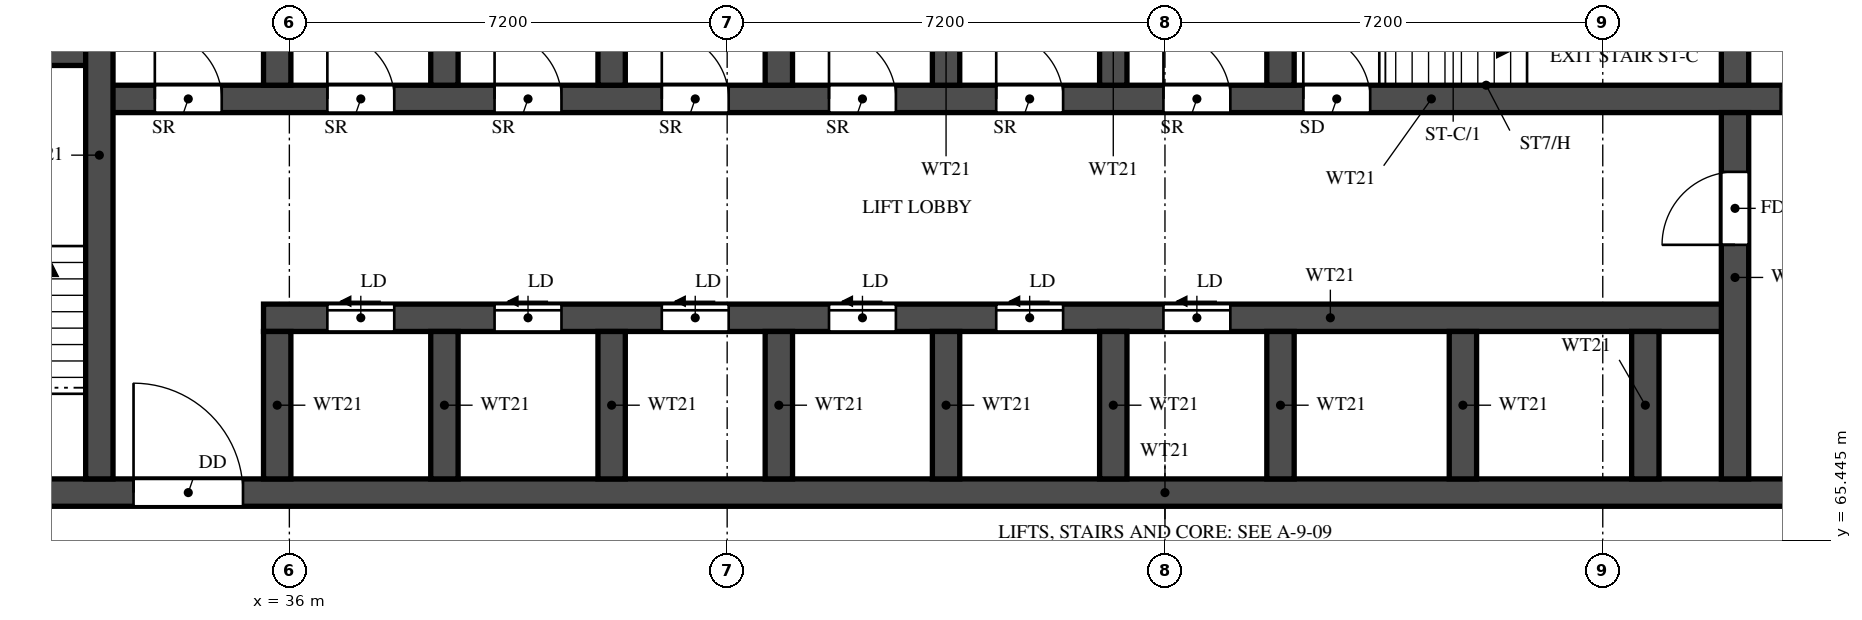
"""IFC4 building model, lengths in metres.
Left out: names, types, materials, properties, quantities, classifications, styles, units other than length and angle.
Written with IfcOpenShell. Run it as: python <this file> out.ifc"""

import sys

from ifc_helpers import new_model, si_unit, direction, frame, frame_2d, origin, place, context, subcontext, project, spatial, rectangle, extrude, element, fill, save


model = new_model("IFC4")
c1 = context("Model", 3, precision=1e-05, world=origin(), true_north=direction((0.0, 1.0)))
c2 = subcontext(c1, "Body", "Model", "MODEL_VIEW")
j1 = project(units=[si_unit("LENGTHUNIT", "METRE"), si_unit("PLANEANGLEUNIT", "RADIAN")], contexts=[c1])
p1 = place(None, origin())
s1 = spatial("IfcSite", under=j1, at=p1, CompositionType="ELEMENT")
p2 = place(p1, origin())
s2 = spatial("IfcBuilding", under=s1, at=p2, CompositionType="ELEMENT")
p3 = place(p2, frame((0.0, 0.0, 41.0)))
s3 = spatial("IfcBuildingStorey", under=s2, at=p3, CompositionType="ELEMENT", Elevation=41.0)
p4 = place(p3, frame((29.7, 66.225, 0.0), z_axis=(0.0, 0.0, 1.0), x_axis=(1.0, 0.0, 0.0)))
e1 = element("IfcWall", 1, at=p4, inside=s3, PredefinedType="SHEAR", context=c2, shape_type="SweptSolid", body=[
    extrude(rectangle(XDim=41.4, YDim=0.45, at=frame_2d((20.7, 0.0))), origin(), (0.0, 0.0, 1.0), 3.18),
])
p5 = place(p4, frame((0.925, 0.0, 0.0)))
e2 = element("IfcOpeningElement", 2, at=p5, cuts=e1, PredefinedType="OPENING", context=c2, shape_type="SweptSolid", body=[
    extrude(rectangle(XDim=1.1, YDim=2.1, at=frame_2d((0.55, 1.05))), frame((0.0, 0.235, 0.0), z_axis=(0.0, -1.0, 0.0), x_axis=(1.0, 0.0, 0.0)), (0.0, 0.0, 1.0), 0.47),
])
p6 = place(p4, frame((3.738, 0.0, 0.0)))
e3 = element("IfcOpeningElement", 3, at=p6, cuts=e1, PredefinedType="OPENING", context=c2, shape_type="SweptSolid", body=[
    extrude(rectangle(XDim=1.8, YDim=2.1, at=frame_2d((0.9, 1.05))), frame((0.0, 0.235, 0.0), z_axis=(0.0, -1.0, 0.0), x_axis=(1.0, 0.0, 0.0)), (0.0, 0.0, 1.0), 0.47),
])
p7 = place(p3, frame((35.575, 69.1, 0.0), z_axis=(0.0, 0.0, 1.0), x_axis=(1.0, 0.0, 0.0)))
e4 = element("IfcWall", 4, at=p7, inside=s3, PredefinedType="SHEAR", context=c2, shape_type="SweptSolid", body=[
    extrude(rectangle(XDim=24.2, YDim=0.45, at=frame_2d((12.1, 0.0))), origin(), (0.0, 0.0, 1.0), 3.18),
])
p8 = place(p7, frame((1.05, 0.0, 0.0)))
e5 = element("IfcOpeningElement", 5, at=p8, cuts=e4, PredefinedType="OPENING", context=c2, shape_type="SweptSolid", body=[
    extrude(rectangle(XDim=1.1, YDim=2.1, at=frame_2d((0.55, 1.05))), frame((0.0, 0.235, 0.0), z_axis=(0.0, -1.0, 0.0), x_axis=(1.0, 0.0, 0.0)), (0.0, 0.0, 1.0), 0.47),
])
p9 = place(p7, frame((3.8, 0.0, 0.0)))
e6 = element("IfcOpeningElement", 6, at=p9, cuts=e4, PredefinedType="OPENING", context=c2, shape_type="SweptSolid", body=[
    extrude(rectangle(XDim=1.1, YDim=2.1, at=frame_2d((0.55, 1.05))), frame((0.0, 0.235, 0.0), z_axis=(0.0, -1.0, 0.0), x_axis=(1.0, 0.0, 0.0)), (0.0, 0.0, 1.0), 0.47),
])
p10 = place(p7, frame((6.55, 0.0, 0.0)))
e7 = element("IfcOpeningElement", 7, at=p10, cuts=e4, PredefinedType="OPENING", context=c2, shape_type="SweptSolid", body=[
    extrude(rectangle(XDim=1.1, YDim=2.1, at=frame_2d((0.55, 1.05))), frame((0.0, 0.235, 0.0), z_axis=(0.0, -1.0, 0.0), x_axis=(1.0, 0.0, 0.0)), (0.0, 0.0, 1.0), 0.47),
])
p11 = place(p7, frame((9.3, 0.0, 0.0)))
e8 = element("IfcOpeningElement", 8, at=p11, cuts=e4, PredefinedType="OPENING", context=c2, shape_type="SweptSolid", body=[
    extrude(rectangle(XDim=1.1, YDim=2.1, at=frame_2d((0.55, 1.05))), frame((0.0, 0.235, 0.0), z_axis=(0.0, -1.0, 0.0), x_axis=(1.0, 0.0, 0.0)), (0.0, 0.0, 1.0), 0.47),
])
p12 = place(p7, frame((12.05, 0.0, 0.0)))
e9 = element("IfcOpeningElement", 9, at=p12, cuts=e4, PredefinedType="OPENING", context=c2, shape_type="SweptSolid", body=[
    extrude(rectangle(XDim=1.1, YDim=2.1, at=frame_2d((0.55, 1.05))), frame((0.0, 0.235, 0.0), z_axis=(0.0, -1.0, 0.0), x_axis=(1.0, 0.0, 0.0)), (0.0, 0.0, 1.0), 0.47),
])
p13 = place(p7, frame((14.8, 0.0, 0.0)))
e10 = element("IfcOpeningElement", 10, at=p13, cuts=e4, PredefinedType="OPENING", context=c2, shape_type="SweptSolid", body=[
    extrude(rectangle(XDim=1.1, YDim=2.1, at=frame_2d((0.55, 1.05))), frame((0.0, 0.235, 0.0), z_axis=(0.0, -1.0, 0.0), x_axis=(1.0, 0.0, 0.0)), (0.0, 0.0, 1.0), 0.47),
])
p14 = place(p3, frame((32.875, 72.7, 0.0), z_axis=(0.0, 0.0, 1.0), x_axis=(1.0, 0.0, 0.0)))
e11 = element("IfcWall", 11, at=p14, inside=s3, PredefinedType="SHEAR", context=c2, shape_type="SweptSolid", body=[
    extrude(rectangle(XDim=35.05, YDim=0.45, at=frame_2d((17.525, 0.0))), origin(), (0.0, 0.0, 1.0), 3.18),
])
p15 = place(p14, frame((19.8, 0.0, 0.0)))
e12 = element("IfcOpeningElement", 12, at=p15, cuts=e11, PredefinedType="OPENING", context=c2, shape_type="SweptSolid", body=[
    extrude(rectangle(XDim=1.1, YDim=2.1, at=frame_2d((0.55, 1.05))), frame((0.0, 0.235, 0.0), z_axis=(0.0, -1.0, 0.0), x_axis=(1.0, 0.0, 0.0)), (0.0, 0.0, 1.0), 0.47),
])
p16 = place(p14, frame((27.65, 0.0, 0.0)))
e13 = element("IfcOpeningElement", 13, at=p16, cuts=e11, PredefinedType="OPENING", context=c2, shape_type="SweptSolid", body=[
    extrude(rectangle(XDim=1.1, YDim=2.1, at=frame_2d((0.55, 1.05))), frame((0.0, 0.235, 0.0), z_axis=(0.0, -1.0, 0.0), x_axis=(1.0, 0.0, 0.0)), (0.0, 0.0, 1.0), 0.47),
])
p17 = place(p14, frame((30.25, 0.0, 0.0)))
e14 = element("IfcOpeningElement", 14, at=p17, cuts=e11, PredefinedType="OPENING", context=c2, shape_type="SweptSolid", body=[
    extrude(rectangle(XDim=1.1, YDim=2.1, at=frame_2d((0.55, 1.05))), frame((0.0, 0.235, 0.0), z_axis=(0.0, -1.0, 0.0), x_axis=(1.0, 0.0, 0.0)), (0.0, 0.0, 1.0), 0.47),
])
p18 = place(p14, frame((3.75, 0.0, 0.0)))
e15 = element("IfcOpeningElement", 15, at=p18, cuts=e11, PredefinedType="OPENING", context=c2, shape_type="SweptSolid", body=[
    extrude(rectangle(XDim=1.1, YDim=2.1, at=frame_2d((0.55, 1.05))), frame((0.0, 0.235, 0.0), z_axis=(0.0, -1.0, 0.0), x_axis=(1.0, 0.0, 0.0)), (0.0, 0.0, 1.0), 0.47),
])
p19 = place(p14, frame((6.5, 0.0, 0.0)))
e16 = element("IfcOpeningElement", 16, at=p19, cuts=e11, PredefinedType="OPENING", context=c2, shape_type="SweptSolid", body=[
    extrude(rectangle(XDim=1.1, YDim=2.1, at=frame_2d((0.55, 1.05))), frame((0.0, 0.235, 0.0), z_axis=(0.0, -1.0, 0.0), x_axis=(1.0, 0.0, 0.0)), (0.0, 0.0, 1.0), 0.47),
])
p20 = place(p14, frame((9.25, 0.0, 0.0)))
e17 = element("IfcOpeningElement", 17, at=p20, cuts=e11, PredefinedType="OPENING", context=c2, shape_type="SweptSolid", body=[
    extrude(rectangle(XDim=1.1, YDim=2.1, at=frame_2d((0.55, 1.05))), frame((0.0, 0.235, 0.0), z_axis=(0.0, -1.0, 0.0), x_axis=(1.0, 0.0, 0.0)), (0.0, 0.0, 1.0), 0.47),
])
p21 = place(p14, frame((12.0, 0.0, 0.0)))
e18 = element("IfcOpeningElement", 18, at=p21, cuts=e11, PredefinedType="OPENING", context=c2, shape_type="SweptSolid", body=[
    extrude(rectangle(XDim=1.1, YDim=2.1, at=frame_2d((0.55, 1.05))), frame((0.0, 0.235, 0.0), z_axis=(0.0, -1.0, 0.0), x_axis=(1.0, 0.0, 0.0)), (0.0, 0.0, 1.0), 0.47),
])
p22 = place(p14, frame((14.75, 0.0, 0.0)))
e19 = element("IfcOpeningElement", 19, at=p22, cuts=e11, PredefinedType="OPENING", context=c2, shape_type="SweptSolid", body=[
    extrude(rectangle(XDim=1.1, YDim=2.1, at=frame_2d((0.55, 1.05))), frame((0.0, 0.235, 0.0), z_axis=(0.0, -1.0, 0.0), x_axis=(1.0, 0.0, 0.0)), (0.0, 0.0, 1.0), 0.47),
])
p23 = place(p14, frame((17.5, 0.0, 0.0)))
e20 = element("IfcOpeningElement", 20, at=p23, cuts=e11, PredefinedType="OPENING", context=c2, shape_type="SweptSolid", body=[
    extrude(rectangle(XDim=1.1, YDim=2.1, at=frame_2d((0.55, 1.05))), frame((0.0, 0.235, 0.0), z_axis=(0.0, -1.0, 0.0), x_axis=(1.0, 0.0, 0.0)), (0.0, 0.0, 1.0), 0.47),
])
p24 = place(p14, frame((0.913, 0.0, 0.0)))
e21 = element("IfcOpeningElement", 21, at=p24, cuts=e11, PredefinedType="OPENING", context=c2, shape_type="SweptSolid", body=[
    extrude(rectangle(XDim=1.1, YDim=2.1, at=frame_2d((0.55, 1.05))), frame((0.0, 0.235, 0.0), z_axis=(0.0, -1.0, 0.0), x_axis=(1.0, 0.0, 0.0)), (0.0, 0.0, 1.0), 0.47),
])
p25 = place(p3, frame((29.7, 73.475, 0.0), z_axis=(0.0, 0.0, 1.0), x_axis=(1.0, 0.0, 0.0)))
e22 = element("IfcWall", 22, at=p25, inside=s3, PredefinedType="SHEAR", context=c2, shape_type="SweptSolid", body=[
    extrude(rectangle(XDim=3.175, YDim=0.45, at=frame_2d((1.587, 0.0))), origin(), (0.0, 0.0, 1.0), 3.18),
])
p26 = place(p3, frame((32.875, 66.45, 0.0), z_axis=(0.0, 0.0, 1.0), x_axis=(0.0, 1.0, 0.0)))
e23 = element("IfcWall", 23, at=p26, inside=s3, PredefinedType="SHEAR", context=c2, shape_type="SweptSolid", body=[
    extrude(rectangle(XDim=10.65, YDim=0.45, at=frame_2d((5.325, 0.0))), origin(), (0.0, 0.0, 1.0), 3.18),
])
p27 = place(p3, frame((59.775, 66.45, 0.0), z_axis=(0.0, 0.0, 1.0), x_axis=(0.0, 1.0, 0.0)))
e24 = element("IfcWall", 24, at=p27, inside=s3, PredefinedType="SHEAR", context=c2, shape_type="SweptSolid", body=[
    extrude(rectangle(XDim=6.025, YDim=0.45, at=frame_2d((3.013, 0.0))), origin(), (0.0, 0.0, 1.0), 3.18),
])
p28 = place(p27, frame((3.85, 0.0, 0.0)))
e25 = element("IfcOpeningElement", 25, at=p28, cuts=e24, PredefinedType="OPENING", context=c2, shape_type="SweptSolid", body=[
    extrude(rectangle(XDim=1.2, YDim=2.1, at=frame_2d((0.6, 1.05))), frame((0.0, 0.235, 0.0), z_axis=(0.0, -1.0, 0.0), x_axis=(1.0, 0.0, 0.0)), (0.0, 0.0, 1.0), 0.47),
])
p29 = place(p3, frame((59.775, 72.925, 0.0), z_axis=(0.0, 0.0, 1.0), x_axis=(0.0, 1.0, 0.0)))
e26 = element("IfcWall", 26, at=p29, inside=s3, PredefinedType="SHEAR", context=c2, shape_type="SweptSolid", body=[
    extrude(rectangle(XDim=2.95, YDim=0.45, at=frame_2d((1.475, 0.0))), origin(), (0.0, 0.0, 1.0), 3.18),
])
for number, where, z_axis, x_axis in (
    (27, (35.8, 66.45, 0.0), (0.0, 0.0, 1.0), (0.0, 1.0, 0.0)),
    (28, (38.55, 66.45, 0.0), (0.0, 0.0, 1.0), (0.0, 1.0, 0.0)),
    (29, (41.3, 66.45, 0.0), (0.0, 0.0, 1.0), (0.0, 1.0, 0.0)),
    (30, (44.05, 66.45, 0.0), (0.0, 0.0, 1.0), (0.0, 1.0, 0.0)),
    (31, (46.8, 66.45, 0.0), (0.0, 0.0, 1.0), (0.0, 1.0, 0.0)),
    (32, (49.55, 66.45, 0.0), (0.0, 0.0, 1.0), (0.0, 1.0, 0.0)),
    (33, (52.3, 66.45, 0.0), (0.0, 0.0, 1.0), (0.0, 1.0, 0.0)),
    (34, (55.3, 66.45, 0.0), (0.0, 0.0, 1.0), (0.0, 1.0, 0.0)),
    (35, (58.3, 66.45, 0.0), (0.0, 0.0, 1.0), (0.0, 1.0, 0.0)),
):
    element("IfcWall", number, at=place(p3, frame(where, z_axis=z_axis, x_axis=x_axis)), inside=s3, PredefinedType="SHEAR", context=c2, shape_type="SweptSolid", body=[
        extrude(rectangle(XDim=2.425, YDim=0.45, at=frame_2d((1.212, 0.0))), origin(), (0.0, 0.0, 1.0), 3.18),
    ])
for number, where, z_axis, x_axis in (
    (36, (35.8, 72.925, 0.0), (0.0, 0.0, 1.0), (0.0, 1.0, 0.0)),
    (37, (38.55, 72.925, 0.0), (0.0, 0.0, 1.0), (0.0, 1.0, 0.0)),
    (38, (41.3, 72.925, 0.0), (0.0, 0.0, 1.0), (0.0, 1.0, 0.0)),
    (39, (44.05, 72.925, 0.0), (0.0, 0.0, 1.0), (0.0, 1.0, 0.0)),
    (40, (46.8, 72.925, 0.0), (0.0, 0.0, 1.0), (0.0, 1.0, 0.0)),
    (41, (49.55, 72.925, 0.0), (0.0, 0.0, 1.0), (0.0, 1.0, 0.0)),
    (42, (52.3, 72.925, 0.0), (0.0, 0.0, 1.0), (0.0, 1.0, 0.0)),
):
    element("IfcWall", number, at=place(p3, frame(where, z_axis=z_axis, x_axis=x_axis)), inside=s3, PredefinedType="SHEAR", context=c2, shape_type="SweptSolid", body=[
        extrude(rectangle(XDim=2.95, YDim=0.45, at=frame_2d((1.475, 0.0))), origin(), (0.0, 0.0, 1.0), 3.18),
    ])
p30 = place(p15, origin())
e43 = element("IfcDoor", 43, at=p30, inside=s3, OperationType="SINGLE_SWING_LEFT", PredefinedType="DOOR", context=c2, shape_type="SweptSolid", body=[
    extrude(rectangle(XDim=1.1, YDim=2.1, at=frame_2d((0.55, 1.05))), frame((0.0, 0.025, 0.0), z_axis=(0.0, -1.0, 0.0), x_axis=(1.0, 0.0, 0.0)), (0.0, 0.0, 1.0), 0.05),
])
fill(e12, e43)
p31 = place(p6, origin())
e44 = element("IfcDoor", 44, at=p31, inside=s3, OperationType="DOUBLE_DOOR_SINGLE_SWING", PredefinedType="DOOR", context=c2, shape_type="SweptSolid", body=[
    extrude(rectangle(XDim=1.8, YDim=2.1, at=frame_2d((0.9, 1.05))), frame((0.0, 0.025, 0.0), z_axis=(0.0, -1.0, 0.0), x_axis=(1.0, 0.0, 0.0)), (0.0, 0.0, 1.0), 0.05),
])
fill(e3, e44)
p32 = place(p28, origin())
e45 = element("IfcDoor", 45, at=p32, inside=s3, OperationType="SINGLE_SWING_RIGHT", PredefinedType="DOOR", context=c2, shape_type="SweptSolid", body=[
    extrude(rectangle(XDim=1.2, YDim=2.1, at=frame_2d((0.6, 1.05))), frame((0.0, 0.025, 0.0), z_axis=(0.0, -1.0, 0.0), x_axis=(1.0, 0.0, 0.0)), (0.0, 0.0, 1.0), 0.05),
])
fill(e25, e45)
p33 = place(p16, origin())
e46 = element("IfcDoor", 46, at=p33, inside=s3, OperationType="SLIDING_TO_LEFT", PredefinedType="DOOR", context=c2, shape_type="SweptSolid", body=[
    extrude(rectangle(XDim=1.1, YDim=2.1, at=frame_2d((0.55, 1.05))), frame((0.0, 0.025, 0.0), z_axis=(0.0, -1.0, 0.0), x_axis=(1.0, 0.0, 0.0)), (0.0, 0.0, 1.0), 0.05),
])
fill(e13, e46)
p34 = place(p8, origin())
e47 = element("IfcDoor", 47, at=p34, inside=s3, OperationType="SLIDING_TO_LEFT", PredefinedType="DOOR", context=c2, shape_type="SweptSolid", body=[
    extrude(rectangle(XDim=1.1, YDim=2.1, at=frame_2d((0.55, 1.05))), frame((0.0, 0.025, 0.0), z_axis=(0.0, -1.0, 0.0), x_axis=(1.0, 0.0, 0.0)), (0.0, 0.0, 1.0), 0.05),
])
fill(e5, e47)
p35 = place(p9, origin())
e48 = element("IfcDoor", 48, at=p35, inside=s3, OperationType="SLIDING_TO_LEFT", PredefinedType="DOOR", context=c2, shape_type="SweptSolid", body=[
    extrude(rectangle(XDim=1.1, YDim=2.1, at=frame_2d((0.55, 1.05))), frame((0.0, 0.025, 0.0), z_axis=(0.0, -1.0, 0.0), x_axis=(1.0, 0.0, 0.0)), (0.0, 0.0, 1.0), 0.05),
])
fill(e6, e48)
p36 = place(p10, origin())
e49 = element("IfcDoor", 49, at=p36, inside=s3, OperationType="SLIDING_TO_LEFT", PredefinedType="DOOR", context=c2, shape_type="SweptSolid", body=[
    extrude(rectangle(XDim=1.1, YDim=2.1, at=frame_2d((0.55, 1.05))), frame((0.0, 0.025, 0.0), z_axis=(0.0, -1.0, 0.0), x_axis=(1.0, 0.0, 0.0)), (0.0, 0.0, 1.0), 0.05),
])
fill(e7, e49)
p37 = place(p11, origin())
e50 = element("IfcDoor", 50, at=p37, inside=s3, OperationType="SLIDING_TO_LEFT", PredefinedType="DOOR", context=c2, shape_type="SweptSolid", body=[
    extrude(rectangle(XDim=1.1, YDim=2.1, at=frame_2d((0.55, 1.05))), frame((0.0, 0.025, 0.0), z_axis=(0.0, -1.0, 0.0), x_axis=(1.0, 0.0, 0.0)), (0.0, 0.0, 1.0), 0.05),
])
fill(e8, e50)
p38 = place(p12, origin())
e51 = element("IfcDoor", 51, at=p38, inside=s3, OperationType="SLIDING_TO_LEFT", PredefinedType="DOOR", context=c2, shape_type="SweptSolid", body=[
    extrude(rectangle(XDim=1.1, YDim=2.1, at=frame_2d((0.55, 1.05))), frame((0.0, 0.025, 0.0), z_axis=(0.0, -1.0, 0.0), x_axis=(1.0, 0.0, 0.0)), (0.0, 0.0, 1.0), 0.05),
])
fill(e9, e51)
p39 = place(p13, origin())
e52 = element("IfcDoor", 52, at=p39, inside=s3, OperationType="SLIDING_TO_LEFT", PredefinedType="DOOR", context=c2, shape_type="SweptSolid", body=[
    extrude(rectangle(XDim=1.1, YDim=2.1, at=frame_2d((0.55, 1.05))), frame((0.0, 0.025, 0.0), z_axis=(0.0, -1.0, 0.0), x_axis=(1.0, 0.0, 0.0)), (0.0, 0.0, 1.0), 0.05),
])
fill(e10, e52)
p40 = place(p18, origin())
e53 = element("IfcDoor", 53, at=p40, inside=s3, OperationType="SINGLE_SWING_LEFT", PredefinedType="DOOR", context=c2, shape_type="SweptSolid", body=[
    extrude(rectangle(XDim=1.1, YDim=2.1, at=frame_2d((0.55, 1.05))), frame((0.0, 0.025, 0.0), z_axis=(0.0, -1.0, 0.0), x_axis=(1.0, 0.0, 0.0)), (0.0, 0.0, 1.0), 0.05),
])
fill(e15, e53)
p41 = place(p19, origin())
e54 = element("IfcDoor", 54, at=p41, inside=s3, OperationType="SINGLE_SWING_LEFT", PredefinedType="DOOR", context=c2, shape_type="SweptSolid", body=[
    extrude(rectangle(XDim=1.1, YDim=2.1, at=frame_2d((0.55, 1.05))), frame((0.0, 0.025, 0.0), z_axis=(0.0, -1.0, 0.0), x_axis=(1.0, 0.0, 0.0)), (0.0, 0.0, 1.0), 0.05),
])
fill(e16, e54)
p42 = place(p20, origin())
e55 = element("IfcDoor", 55, at=p42, inside=s3, OperationType="SINGLE_SWING_LEFT", PredefinedType="DOOR", context=c2, shape_type="SweptSolid", body=[
    extrude(rectangle(XDim=1.1, YDim=2.1, at=frame_2d((0.55, 1.05))), frame((0.0, 0.025, 0.0), z_axis=(0.0, -1.0, 0.0), x_axis=(1.0, 0.0, 0.0)), (0.0, 0.0, 1.0), 0.05),
])
fill(e17, e55)
p43 = place(p21, origin())
e56 = element("IfcDoor", 56, at=p43, inside=s3, OperationType="SINGLE_SWING_LEFT", PredefinedType="DOOR", context=c2, shape_type="SweptSolid", body=[
    extrude(rectangle(XDim=1.1, YDim=2.1, at=frame_2d((0.55, 1.05))), frame((0.0, 0.025, 0.0), z_axis=(0.0, -1.0, 0.0), x_axis=(1.0, 0.0, 0.0)), (0.0, 0.0, 1.0), 0.05),
])
fill(e18, e56)
p44 = place(p22, origin())
e57 = element("IfcDoor", 57, at=p44, inside=s3, OperationType="SINGLE_SWING_LEFT", PredefinedType="DOOR", context=c2, shape_type="SweptSolid", body=[
    extrude(rectangle(XDim=1.1, YDim=2.1, at=frame_2d((0.55, 1.05))), frame((0.0, 0.025, 0.0), z_axis=(0.0, -1.0, 0.0), x_axis=(1.0, 0.0, 0.0)), (0.0, 0.0, 1.0), 0.05),
])
fill(e19, e57)
p45 = place(p23, origin())
e58 = element("IfcDoor", 58, at=p45, inside=s3, OperationType="SINGLE_SWING_LEFT", PredefinedType="DOOR", context=c2, shape_type="SweptSolid", body=[
    extrude(rectangle(XDim=1.1, YDim=2.1, at=frame_2d((0.55, 1.05))), frame((0.0, 0.025, 0.0), z_axis=(0.0, -1.0, 0.0), x_axis=(1.0, 0.0, 0.0)), (0.0, 0.0, 1.0), 0.05),
])
fill(e20, e58)
p46 = place(p24, origin())
e59 = element("IfcDoor", 59, at=p46, inside=s3, OperationType="SINGLE_SWING_LEFT", PredefinedType="DOOR", context=c2, shape_type="SweptSolid", body=[
    extrude(rectangle(XDim=1.1, YDim=2.1, at=frame_2d((0.55, 1.05))), frame((0.0, 0.025, 0.0), z_axis=(0.0, -1.0, 0.0), x_axis=(1.0, 0.0, 0.0)), (0.0, 0.0, 1.0), 0.05),
])
fill(e21, e59)
save(model, sys.argv[1])
